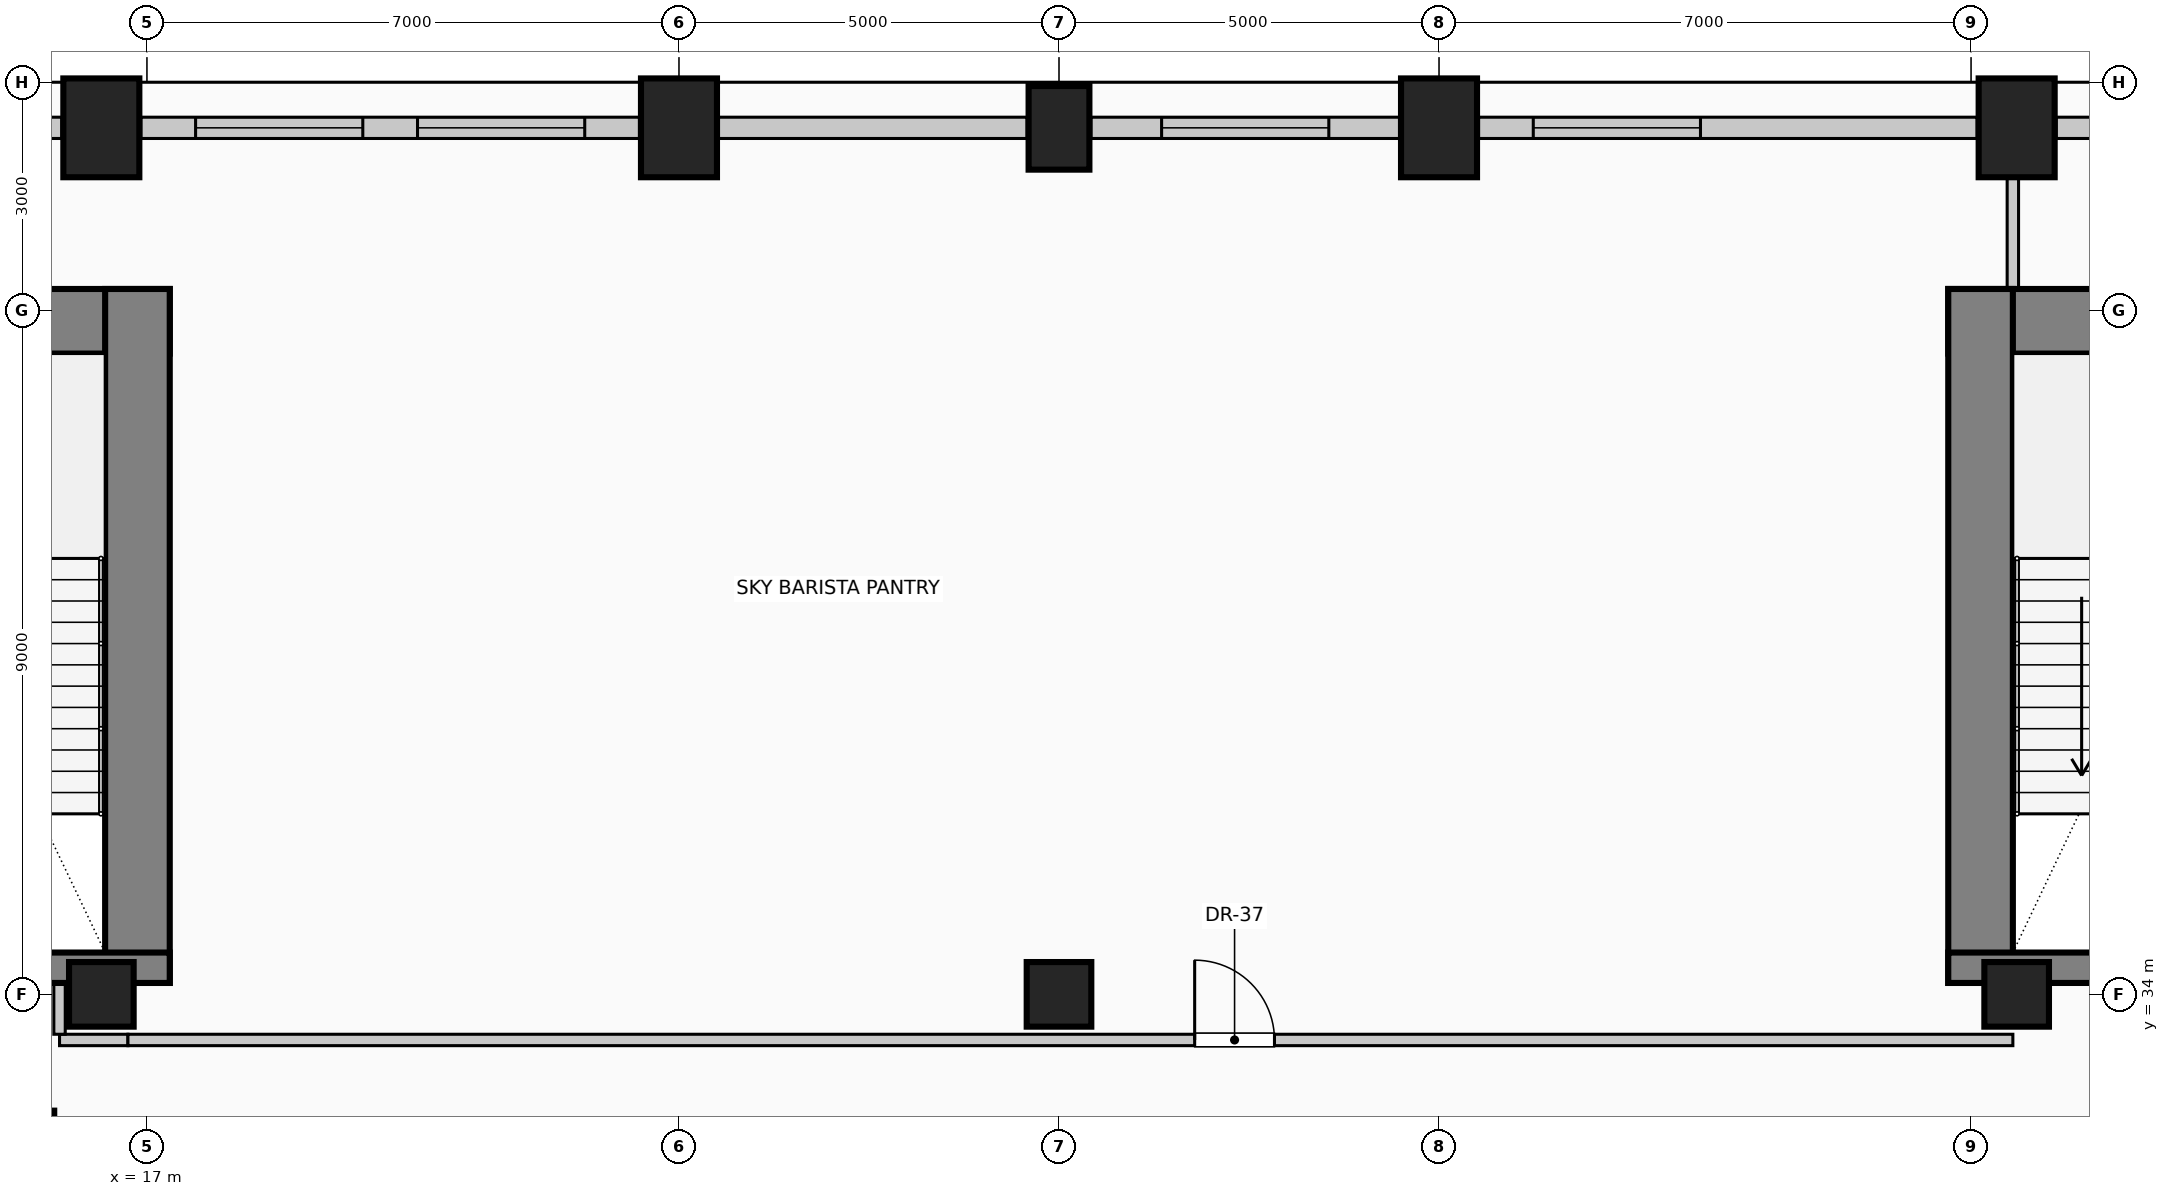
"""IFC4 building model, lengths in metres.
Left out: names, types, materials, properties, quantities, classifications, styles, units other than length and angle.
Written with IfcOpenShell. Run it as: python <this file> out.ifc"""

import sys

from ifc_helpers import new_model, si_unit, direction, frame, frame_2d, origin, origin_2d, place, context, subcontext, project, spatial, rectangle, circle, extrude, element, fill, save


model = new_model("IFC4")
c1 = context("Model", 3, precision=1e-05, world=origin(), true_north=direction((0.0, 1.0)))
c2 = subcontext(c1, "Body", "Model", "MODEL_VIEW")
j1 = project(units=[si_unit("LENGTHUNIT", "METRE"), si_unit("PLANEANGLEUNIT", "RADIAN")], contexts=[c1])
p1 = place(None, origin())
s1 = spatial("IfcSite", under=j1, at=p1, CompositionType="ELEMENT")
p2 = place(p1, origin())
s2 = spatial("IfcBuilding", under=s1, at=p2, CompositionType="ELEMENT")
p3 = place(p2, frame((0.0, 0.0, 165.8)))
s3 = spatial("IfcBuildingStorey", under=s2, at=p3, CompositionType="ELEMENT", Elevation=165.8)
p4 = place(p3, frame((2.7, 42.855, 0.0), z_axis=(0.0, 0.0, 1.0), x_axis=(1.0, 0.0, 0.0)))
e1 = element("IfcWall", 1, at=p4, inside=s3, PredefinedType="SHEAR", context=c2, shape_type="SweptSolid", body=[
    extrude(rectangle(XDim=14.6, YDim=0.85, at=frame_2d((7.3, 0.0))), origin(), (0.0, 0.0, 1.0), 4.8),
])
p5 = place(p3, frame((16.875, 34.15, 0.0), z_axis=(0.0, 0.0, 1.0), x_axis=(0.0, 1.0, 0.0)))
e2 = element("IfcWall", 2, at=p5, inside=s3, PredefinedType="SHEAR", context=c2, shape_type="SweptSolid", body=[
    extrude(rectangle(XDim=9.13, YDim=0.85, at=frame_2d((4.565, 0.0))), origin(), (0.0, 0.0, 1.0), 4.8),
])
p6 = place(p3, frame((12.29, 34.35, 0.0), z_axis=(0.0, 0.0, 1.0), x_axis=(1.0, 0.0, 0.0)))
e3 = element("IfcWall", 3, at=p6, inside=s3, PredefinedType="SHEAR", context=c2, shape_type="SweptSolid", body=[
    extrude(rectangle(XDim=5.01, YDim=0.4, at=frame_2d((2.505, 0.0))), origin(), (0.0, 0.0, 1.0), 4.8),
])
p7 = place(p6, frame((1.4, 0.0, 0.0)))
e4 = element("IfcOpeningElement", 4, at=p7, cuts=e3, PredefinedType="OPENING", context=c2, shape_type="SweptSolid", body=[
    extrude(rectangle(XDim=1.15, YDim=2.2, at=frame_2d((0.575, 1.1))), frame((0.0, 0.21, 0.0), z_axis=(0.0, -1.0, 0.0), x_axis=(1.0, 0.0, 0.0)), (0.0, 0.0, 1.0), 0.42),
])
p8 = place(p3, frame((40.7, 42.855, 0.0), z_axis=(0.0, 0.0, 1.0), x_axis=(1.0, 0.0, 0.0)))
e5 = element("IfcWall", 5, at=p8, inside=s3, PredefinedType="SHEAR", context=c2, shape_type="SweptSolid", body=[
    extrude(rectangle(XDim=14.6, YDim=0.85, at=frame_2d((7.3, 0.0))), origin(), (0.0, 0.0, 1.0), 4.8),
])
p9 = place(p3, frame((41.125, 34.15, 0.0), z_axis=(0.0, 0.0, 1.0), x_axis=(0.0, 1.0, 0.0)))
e6 = element("IfcWall", 6, at=p9, inside=s3, PredefinedType="SHEAR", context=c2, shape_type="SweptSolid", body=[
    extrude(rectangle(XDim=9.13, YDim=0.85, at=frame_2d((4.565, 0.0))), origin(), (0.0, 0.0, 1.0), 4.8),
])
p10 = place(p3, frame((40.7, 34.35, 0.0), z_axis=(0.0, 0.0, 1.0), x_axis=(1.0, 0.0, 0.0)))
e7 = element("IfcWall", 7, at=p10, inside=s3, PredefinedType="SHEAR", context=c2, shape_type="SweptSolid", body=[
    extrude(rectangle(XDim=5.01, YDim=0.4, at=frame_2d((2.505, 0.0))), origin(), (0.0, 0.0, 1.0), 4.8),
])
p11 = place(p10, frame((2.4, 0.0, 0.0)))
e8 = element("IfcOpeningElement", 8, at=p11, cuts=e7, PredefinedType="OPENING", context=c2, shape_type="SweptSolid", body=[
    extrude(rectangle(XDim=1.15, YDim=2.2, at=frame_2d((0.575, 1.1))), frame((0.0, 0.21, 0.0), z_axis=(0.0, -1.0, 0.0), x_axis=(1.0, 0.0, 0.0)), (0.0, 0.0, 1.0), 0.42),
])
for number, where, z_axis, x_axis in (
    (9, (16.4, 45.4, 0.0), (0.0, 0.0, 1.0), (1.0, 0.0, 0.0)),
    (10, (24.0, 45.4, 0.0), (0.0, 0.0, 1.0), (1.0, 0.0, 0.0)),
):
    element("IfcColumn", number, at=place(p3, frame(where, z_axis=z_axis, x_axis=x_axis)), inside=s3, PredefinedType="COLUMN", context=c2, shape_type="SweptSolid", body=[
        extrude(rectangle(XDim=1.0, YDim=1.3, at=origin_2d()), origin(), (0.0, 0.0, 1.0), 4.8),
    ])
p12 = place(p3, frame((29.0, 45.4, 0.0), z_axis=(0.0, 0.0, 1.0), x_axis=(1.0, 0.0, 0.0)))
e11 = element("IfcColumn", 11, at=p12, inside=s3, PredefinedType="COLUMN", context=c2, shape_type="SweptSolid", body=[
    extrude(rectangle(XDim=0.8, YDim=1.1, at=origin_2d()), origin(), (0.0, 0.0, 1.0), 4.8),
])
for number, where, z_axis, x_axis in (
    (12, (34.0, 45.4, 0.0), (0.0, 0.0, 1.0), (1.0, 0.0, 0.0)),
    (13, (41.6, 45.4, 0.0), (0.0, 0.0, 1.0), (1.0, 0.0, 0.0)),
):
    element("IfcColumn", number, at=place(p3, frame(where, z_axis=z_axis, x_axis=x_axis)), inside=s3, PredefinedType="COLUMN", context=c2, shape_type="SweptSolid", body=[
        extrude(rectangle(XDim=1.0, YDim=1.3, at=origin_2d()), origin(), (0.0, 0.0, 1.0), 4.8),
    ])
for number, where, z_axis, x_axis in (
    (14, (16.4, 34.0, 0.0), (0.0, 0.0, 1.0), (1.0, 0.0, 0.0)),
    (15, (29.0, 34.0, 0.0), (0.0, 0.0, 1.0), (1.0, 0.0, 0.0)),
    (16, (41.6, 34.0, 0.0), (0.0, 0.0, 1.0), (1.0, 0.0, 0.0)),
):
    element("IfcColumn", number, at=place(p3, frame(where, z_axis=z_axis, x_axis=x_axis)), inside=s3, PredefinedType="COLUMN", context=c2, shape_type="SweptSolid", body=[
        extrude(circle(Radius=0.425, at=origin_2d()), origin(), (0.0, 0.0, 1.0), 4.8),
    ])
p13 = place(p3, frame((14.42, 45.4, 0.0), z_axis=(0.0, 0.0, 1.0), x_axis=(1.0, 0.0, 0.0)))
e17 = element("IfcWall", 17, at=p13, inside=s3, PredefinedType="SOLIDWALL", context=c2, shape_type="SweptSolid", body=[
    extrude(rectangle(XDim=1.46, YDim=0.28, at=frame_2d((0.73, 0.0))), origin(), (0.0, 0.0, 1.0), 3.675),
])
p14 = place(p3, frame((16.92, 45.4, 0.0), z_axis=(0.0, 0.0, 1.0), x_axis=(1.0, 0.0, 0.0)))
e18 = element("IfcWall", 18, at=p14, inside=s3, PredefinedType="SOLIDWALL", context=c2, shape_type="SweptSolid", body=[
    extrude(rectangle(XDim=6.56, YDim=0.28, at=frame_2d((3.28, 0.0))), origin(), (0.0, 0.0, 1.0), 3.675),
])
p15 = place(p14, frame((0.72, 0.0, 0.5)))
e19 = element("IfcOpeningElement", 19, at=p15, cuts=e18, PredefinedType="OPENING", context=c2, shape_type="SweptSolid", body=[
    extrude(rectangle(XDim=2.2, YDim=1.95, at=frame_2d((1.1, 0.975))), frame((0.0, 0.15, 0.0), z_axis=(0.0, -1.0, 0.0), x_axis=(1.0, 0.0, 0.0)), (0.0, 0.0, 1.0), 0.3),
])
p16 = place(p14, frame((3.64, 0.0, 0.5)))
e20 = element("IfcOpeningElement", 20, at=p16, cuts=e18, PredefinedType="OPENING", context=c2, shape_type="SweptSolid", body=[
    extrude(rectangle(XDim=2.2, YDim=1.95, at=frame_2d((1.1, 0.975))), frame((0.0, 0.15, 0.0), z_axis=(0.0, -1.0, 0.0), x_axis=(1.0, 0.0, 0.0)), (0.0, 0.0, 1.0), 0.3),
])
p17 = place(p3, frame((24.52, 45.4, 0.0), z_axis=(0.0, 0.0, 1.0), x_axis=(1.0, 0.0, 0.0)))
e21 = element("IfcWall", 21, at=p17, inside=s3, PredefinedType="SOLIDWALL", context=c2, shape_type="SweptSolid", body=[
    extrude(rectangle(XDim=4.06, YDim=0.28, at=frame_2d((2.03, 0.0))), origin(), (0.0, 0.0, 1.0), 3.675),
])
p18 = place(p3, frame((29.42, 45.4, 0.0), z_axis=(0.0, 0.0, 1.0), x_axis=(1.0, 0.0, 0.0)))
e22 = element("IfcWall", 22, at=p18, inside=s3, PredefinedType="SOLIDWALL", context=c2, shape_type="SweptSolid", body=[
    extrude(rectangle(XDim=4.06, YDim=0.28, at=frame_2d((2.03, 0.0))), origin(), (0.0, 0.0, 1.0), 3.675),
])
p19 = place(p18, frame((0.93, 0.0, 0.5)))
e23 = element("IfcOpeningElement", 23, at=p19, cuts=e22, PredefinedType="OPENING", context=c2, shape_type="SweptSolid", body=[
    extrude(rectangle(XDim=2.2, YDim=1.95, at=frame_2d((1.1, 0.975))), frame((0.0, 0.15, 0.0), z_axis=(0.0, -1.0, 0.0), x_axis=(1.0, 0.0, 0.0)), (0.0, 0.0, 1.0), 0.3),
])
p20 = place(p3, frame((34.52, 45.4, 0.0), z_axis=(0.0, 0.0, 1.0), x_axis=(1.0, 0.0, 0.0)))
e24 = element("IfcWall", 24, at=p20, inside=s3, PredefinedType="SOLIDWALL", context=c2, shape_type="SweptSolid", body=[
    extrude(rectangle(XDim=6.56, YDim=0.28, at=frame_2d((3.28, 0.0))), origin(), (0.0, 0.0, 1.0), 3.675),
])
p21 = place(p20, frame((0.72, 0.0, 0.5)))
e25 = element("IfcOpeningElement", 25, at=p21, cuts=e24, PredefinedType="OPENING", context=c2, shape_type="SweptSolid", body=[
    extrude(rectangle(XDim=2.2, YDim=1.95, at=frame_2d((1.1, 0.975))), frame((0.0, 0.15, 0.0), z_axis=(0.0, -1.0, 0.0), x_axis=(1.0, 0.0, 0.0)), (0.0, 0.0, 1.0), 0.3),
])
p22 = place(p3, frame((42.12, 45.4, 0.0), z_axis=(0.0, 0.0, 1.0), x_axis=(1.0, 0.0, 0.0)))
e26 = element("IfcWall", 26, at=p22, inside=s3, PredefinedType="SOLIDWALL", context=c2, shape_type="SweptSolid", body=[
    extrude(rectangle(XDim=1.46, YDim=0.28, at=frame_2d((0.73, 0.0))), origin(), (0.0, 0.0, 1.0), 3.675),
])
p23 = place(p3, frame((14.0, 32.32, 0.0), z_axis=(0.0, 0.0, 1.0), x_axis=(1.0, 0.0, 0.0)))
e27 = element("IfcWall", 27, at=p23, inside=s3, PredefinedType="SOLIDWALL", context=c2, shape_type="SweptSolid", body=[
    extrude(rectangle(XDim=1.78, YDim=0.3, at=frame_2d((0.89, 0.0))), origin(), (0.0, 0.0, 1.0), 4.8),
])
p24 = place(p23, frame((0.34, 0.0, 0.0)))
e28 = element("IfcOpeningElement", 28, at=p24, cuts=e27, PredefinedType="OPENING", context=c2, shape_type="SweptSolid", body=[
    extrude(rectangle(XDim=1.1, YDim=2.2, at=frame_2d((0.55, 1.1))), frame((0.0, 0.16, 0.0), z_axis=(0.0, -1.0, 0.0), x_axis=(1.0, 0.0, 0.0)), (0.0, 0.0, 1.0), 0.32),
])
p25 = place(p3, frame((15.85, 33.4, 0.0), z_axis=(0.0, 0.0, 1.0), x_axis=(1.0, 0.0, 0.0)))
e29 = element("IfcWall", 29, at=p25, inside=s3, PredefinedType="PARTITIONING", context=c2, shape_type="SweptSolid", body=[
    extrude(rectangle(XDim=0.9, YDim=0.15, at=frame_2d((0.45, 0.0))), origin(), (0.0, 0.0, 1.0), 4.525),
])
p26 = place(p3, frame((16.75, 33.4, 0.0), z_axis=(0.0, 0.0, 1.0), x_axis=(1.0, 0.0, 0.0)))
e30 = element("IfcWall", 30, at=p26, inside=s3, PredefinedType="PARTITIONING", context=c2, shape_type="SweptSolid", body=[
    extrude(rectangle(XDim=24.8, YDim=0.15, at=frame_2d((12.4, 0.0))), origin(), (0.0, 0.0, 1.0), 4.525),
])
p27 = place(p26, frame((14.035, 0.0, 0.0)))
e31 = element("IfcOpeningElement", 31, at=p27, cuts=e30, PredefinedType="OPENING", context=c2, shape_type="SweptSolid", body=[
    extrude(rectangle(XDim=1.05, YDim=2.15, at=frame_2d((0.525, 1.075))), frame((0.0, 0.085, 0.0), z_axis=(0.0, -1.0, 0.0), x_axis=(1.0, 0.0, 0.0)), (0.0, 0.0, 1.0), 0.17),
])
p28 = place(p3, frame((15.85, 33.475, 0.0), z_axis=(0.0, 0.0, 1.0), x_axis=(0.0, 1.0, 0.0)))
e32 = element("IfcWall", 32, at=p28, inside=s3, PredefinedType="PARTITIONING", context=c2, shape_type="SweptSolid", body=[
    extrude(rectangle(XDim=0.675, YDim=0.15, at=frame_2d((0.337, 0.0))), origin(), (0.0, 0.0, 1.0), 4.525),
])
p29 = place(p3, frame((41.55, 43.28, 0.0), z_axis=(0.0, 0.0, 1.0), x_axis=(0.0, 1.0, 0.0)))
e33 = element("IfcWall", 33, at=p29, inside=s3, PredefinedType="PARTITIONING", context=c2, shape_type="SweptSolid", body=[
    extrude(rectangle(XDim=1.47, YDim=0.15, at=frame_2d((0.735, 0.0))), origin(), (0.0, 0.0, 1.0), 4.525),
])
p30 = place(p15, origin())
e34 = element("IfcWindow", 34, at=p30, inside=s3, PartitioningType="SINGLE_PANEL", PredefinedType="WINDOW", context=c2, shape_type="SweptSolid", body=[
    extrude(rectangle(XDim=2.2, YDim=1.95, at=frame_2d((1.1, 0.975))), frame((0.0, 0.03, 0.0), z_axis=(0.0, -1.0, 0.0), x_axis=(1.0, 0.0, 0.0)), (0.0, 0.0, 1.0), 0.06),
])
fill(e19, e34)
p31 = place(p16, origin())
e35 = element("IfcWindow", 35, at=p31, inside=s3, PartitioningType="SINGLE_PANEL", PredefinedType="WINDOW", context=c2, shape_type="SweptSolid", body=[
    extrude(rectangle(XDim=2.2, YDim=1.95, at=frame_2d((1.1, 0.975))), frame((0.0, 0.03, 0.0), z_axis=(0.0, -1.0, 0.0), x_axis=(1.0, 0.0, 0.0)), (0.0, 0.0, 1.0), 0.06),
])
fill(e20, e35)
p32 = place(p19, origin())
e36 = element("IfcWindow", 36, at=p32, inside=s3, PartitioningType="SINGLE_PANEL", PredefinedType="WINDOW", context=c2, shape_type="SweptSolid", body=[
    extrude(rectangle(XDim=2.2, YDim=1.95, at=frame_2d((1.1, 0.975))), frame((0.0, 0.03, 0.0), z_axis=(0.0, -1.0, 0.0), x_axis=(1.0, 0.0, 0.0)), (0.0, 0.0, 1.0), 0.06),
])
fill(e23, e36)
p33 = place(p21, origin())
e37 = element("IfcWindow", 37, at=p33, inside=s3, PartitioningType="SINGLE_PANEL", PredefinedType="WINDOW", context=c2, shape_type="SweptSolid", body=[
    extrude(rectangle(XDim=2.2, YDim=1.95, at=frame_2d((1.1, 0.975))), frame((0.0, 0.03, 0.0), z_axis=(0.0, -1.0, 0.0), x_axis=(1.0, 0.0, 0.0)), (0.0, 0.0, 1.0), 0.06),
])
fill(e25, e37)
p34 = place(p27, origin())
e38 = element("IfcDoor", 38, at=p34, inside=s3, OperationType="SINGLE_SWING_LEFT", PredefinedType="DOOR", context=c2, shape_type="SweptSolid", body=[
    extrude(rectangle(XDim=1.05, YDim=2.15, at=frame_2d((0.525, 1.075))), frame((0.0, 0.025, 0.0), z_axis=(0.0, -1.0, 0.0), x_axis=(1.0, 0.0, 0.0)), (0.0, 0.0, 1.0), 0.05),
])
fill(e31, e38)
save(model, sys.argv[1])
